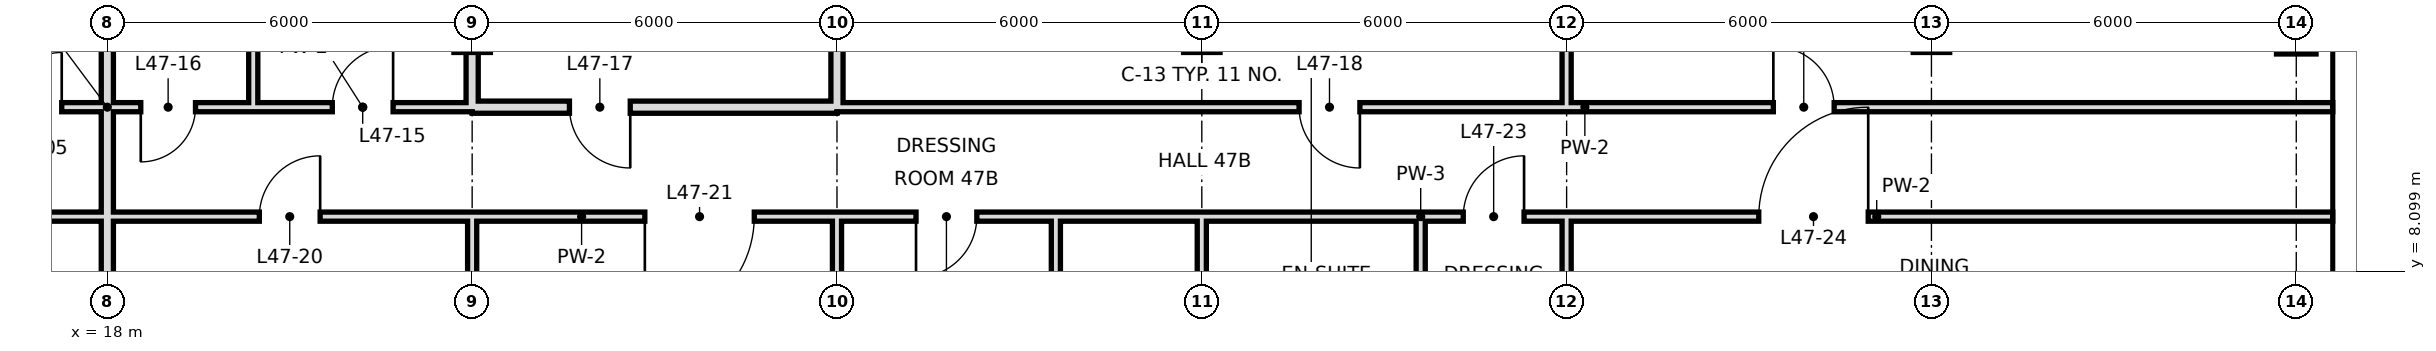
"""IFC4 building model, lengths in metres.
Left out: names, types, materials, properties, quantities, classifications, styles, units other than length and angle.
Written with IfcOpenShell. Run it as: python <this file> out.ifc"""

import sys

from ifc_helpers import new_model, si_unit, direction, frame, frame_2d, origin, origin_2d, place, context, subcontext, project, spatial, rectangle, hollow_rectangle, extrude, element, fill, save


model = new_model("IFC4")
c1 = context("Model", 3, precision=1e-05, world=origin(), true_north=direction((0.0, 1.0)))
c2 = subcontext(c1, "Body", "Model", "MODEL_VIEW")
j1 = project(units=[si_unit("LENGTHUNIT", "METRE"), si_unit("PLANEANGLEUNIT", "RADIAN")], contexts=[c1])
p1 = place(None, origin())
s1 = spatial("IfcSite", under=j1, at=p1, CompositionType="ELEMENT")
p2 = place(p1, origin())
s2 = spatial("IfcBuilding", under=s1, at=p2, CompositionType="ELEMENT")
p3 = place(p2, frame((0.0, 0.0, 202.8)))
s3 = spatial("IfcBuildingStorey", under=s2, at=p3, CompositionType="ELEMENT", Elevation=202.8)
p4 = place(p3, frame((54.0, 12.0, 0.0), z_axis=(0.0, 0.0, 1.0), x_axis=(1.0, 0.0, 0.0)))
e1 = element("IfcColumn", 1, at=p4, inside=s3, PredefinedType="COLUMN", context=c2, shape_type="SweptSolid", body=[
    extrude(hollow_rectangle(XDim=0.65, YDim=0.65, WallThickness=0.032, at=origin_2d()), origin(), (0.0, 0.0, 1.0), 3.6),
])
p5 = place(p3, frame((18.0, -0.6, 0.0), z_axis=(0.0, 0.0, 1.0), x_axis=(0.0, 1.0, 0.0)))
e2 = element("IfcWall", 2, at=p5, inside=s3, PredefinedType="SOLIDWALL", context=c2, shape_type="SweptSolid", body=[
    extrude(rectangle(XDim=15.9, YDim=0.2, at=frame_2d((7.95, 0.0))), origin(), (0.0, 0.0, 1.0), 2.72),
])
p6 = place(p3, frame((20.4, 10.8, 0.0), z_axis=(0.0, 0.0, 1.0), x_axis=(0.0, 1.0, 0.0)))
e3 = element("IfcWall", 3, at=p6, inside=s3, PredefinedType="PARTITIONING", context=c2, shape_type="SweptSolid", body=[
    extrude(rectangle(XDim=4.5, YDim=0.15, at=frame_2d((2.25, 0.0))), origin(), (0.0, 0.0, 1.0), 3.42),
])
p7 = place(p3, frame((24.0, 10.8, 0.0), z_axis=(0.0, 0.0, 1.0), x_axis=(0.0, 1.0, 0.0)))
e4 = element("IfcWall", 4, at=p7, inside=s3, PredefinedType="SOLIDWALL", context=c2, shape_type="SweptSolid", body=[
    extrude(rectangle(XDim=4.5, YDim=0.2, at=frame_2d((2.25, 0.0))), origin(), (0.0, 0.0, 1.0), 2.72),
])
p8 = place(p3, frame((24.0, 0.0, 0.0), z_axis=(0.0, 0.0, 1.0), x_axis=(0.0, 1.0, 0.0)))
e5 = element("IfcWall", 5, at=p8, inside=s3, PredefinedType="PARTITIONING", context=c2, shape_type="SweptSolid", body=[
    extrude(rectangle(XDim=9.0, YDim=0.15, at=frame_2d((4.5, 0.0))), origin(), (0.0, 0.0, 1.0), 2.72),
])
p9 = place(p3, frame((30.0, 10.8, 0.0), z_axis=(0.0, 0.0, 1.0), x_axis=(0.0, 1.0, 0.0)))
e6 = element("IfcWall", 6, at=p9, inside=s3, PredefinedType="SOLIDWALL", context=c2, shape_type="SweptSolid", body=[
    extrude(rectangle(XDim=4.5, YDim=0.2, at=frame_2d((2.25, 0.0))), origin(), (0.0, 0.0, 1.0), 2.72),
])
p10 = place(p3, frame((30.0, -0.6, 0.0), z_axis=(0.0, 0.0, 1.0), x_axis=(0.0, 1.0, 0.0)))
e7 = element("IfcWall", 7, at=p10, inside=s3, PredefinedType="PARTITIONING", context=c2, shape_type="SweptSolid", body=[
    extrude(rectangle(XDim=9.6, YDim=0.15, at=frame_2d((4.8, 0.0))), origin(), (0.0, 0.0, 1.0), 2.72),
])
p11 = place(p3, frame((33.6, 6.0, 0.0), z_axis=(0.0, 0.0, 1.0), x_axis=(0.0, 1.0, 0.0)))
e8 = element("IfcWall", 8, at=p11, inside=s3, PredefinedType="PARTITIONING", context=c2, shape_type="SweptSolid", body=[
    extrude(rectangle(XDim=3.0, YDim=0.15, at=frame_2d((1.5, 0.0))), origin(), (0.0, 0.0, 1.0), 3.42),
])
p12 = place(p3, frame((36.0, 6.0, 0.0), z_axis=(0.0, 0.0, 1.0), x_axis=(0.0, 1.0, 0.0)))
e9 = element("IfcWall", 9, at=p12, inside=s3, PredefinedType="PARTITIONING", context=c2, shape_type="SweptSolid", body=[
    extrude(rectangle(XDim=3.0, YDim=0.15, at=frame_2d((1.5, 0.0))), origin(), (0.0, 0.0, 1.0), 2.72),
])
p13 = place(p3, frame((39.6, 6.0, 0.0), z_axis=(0.0, 0.0, 1.0), x_axis=(0.0, 1.0, 0.0)))
e10 = element("IfcWall", 10, at=p13, inside=s3, PredefinedType="PARTITIONING", context=c2, shape_type="SweptSolid", body=[
    extrude(rectangle(XDim=3.0, YDim=0.15, at=frame_2d((1.5, 0.0))), origin(), (0.0, 0.0, 1.0), 3.42),
])
p14 = place(p3, frame((42.0, -0.6, 0.0), z_axis=(0.0, 0.0, 1.0), x_axis=(0.0, 1.0, 0.0)))
e11 = element("IfcWall", 11, at=p14, inside=s3, PredefinedType="PARTITIONING", context=c2, shape_type="SweptSolid", body=[
    extrude(rectangle(XDim=9.6, YDim=0.15, at=frame_2d((4.8, 0.0))), origin(), (0.0, 0.0, 1.0), 2.72),
])
p15 = place(p3, frame((42.0, 10.8, 0.0), z_axis=(0.0, 0.0, 1.0), x_axis=(0.0, 1.0, 0.0)))
e12 = element("IfcWall", 12, at=p15, inside=s3, PredefinedType="PARTITIONING", context=c2, shape_type="SweptSolid", body=[
    extrude(rectangle(XDim=4.5, YDim=0.15, at=frame_2d((2.25, 0.0))), origin(), (0.0, 0.0, 1.0), 2.72),
])
p16 = place(p3, frame((24.0, 10.8, 0.0), z_axis=(0.0, 0.0, 1.0), x_axis=(1.0, 0.0, 0.0)))
e13 = element("IfcWall", 13, at=p16, inside=s3, PredefinedType="SOLIDWALL", context=c2, shape_type="SweptSolid", body=[
    extrude(rectangle(XDim=6.0, YDim=0.2, at=frame_2d((3.0, 0.0))), origin(), (0.0, 0.0, 1.0), 2.72),
])
p17 = place(p16, frame((1.6, 0.0, 0.0)))
e14 = element("IfcOpeningElement", 14, at=p17, cuts=e13, PredefinedType="OPENING", context=c2, shape_type="SweptSolid", body=[
    extrude(rectangle(XDim=1.0, YDim=2.4, at=frame_2d((0.5, 1.2))), frame((0.0, 0.11, 0.0), z_axis=(0.0, -1.0, 0.0), x_axis=(1.0, 0.0, 0.0)), (0.0, 0.0, 1.0), 0.22),
])
p18 = place(p3, frame((20.4, 10.8, 0.0), z_axis=(0.0, 0.0, 1.0), x_axis=(1.0, 0.0, 0.0)))
e15 = element("IfcWall", 15, at=p18, inside=s3, PredefinedType="PARTITIONING", context=c2, shape_type="SweptSolid", body=[
    extrude(rectangle(XDim=3.6, YDim=0.15, at=frame_2d((1.8, 0.0))), origin(), (0.0, 0.0, 1.0), 3.42),
])
p19 = place(p18, frame((1.3, 0.0, 0.0)))
e16 = element("IfcOpeningElement", 16, at=p19, cuts=e15, PredefinedType="OPENING", context=c2, shape_type="SweptSolid", body=[
    extrude(rectangle(XDim=1.0, YDim=2.4, at=frame_2d((0.5, 1.2))), frame((0.0, 0.085, 0.0), z_axis=(0.0, -1.0, 0.0), x_axis=(1.0, 0.0, 0.0)), (0.0, 0.0, 1.0), 0.17),
])
p20 = place(p3, frame((30.0, 10.8, 0.0), z_axis=(0.0, 0.0, 1.0), x_axis=(1.0, 0.0, 0.0)))
e17 = element("IfcWall", 17, at=p20, inside=s3, PredefinedType="PARTITIONING", context=c2, shape_type="SweptSolid", body=[
    extrude(rectangle(XDim=24.6, YDim=0.15, at=frame_2d((12.3, 0.0))), origin(), (0.0, 0.0, 1.0), 3.42),
])
p21 = place(p20, frame((7.6, 0.0, 0.0)))
e18 = element("IfcOpeningElement", 18, at=p21, cuts=e17, PredefinedType="OPENING", context=c2, shape_type="SweptSolid", body=[
    extrude(rectangle(XDim=1.0, YDim=2.4, at=frame_2d((0.5, 1.2))), frame((0.0, 0.085, 0.0), z_axis=(0.0, -1.0, 0.0), x_axis=(1.0, 0.0, 0.0)), (0.0, 0.0, 1.0), 0.17),
])
p22 = place(p20, frame((15.4, 0.0, 0.0)))
e19 = element("IfcOpeningElement", 19, at=p22, cuts=e17, PredefinedType="OPENING", context=c2, shape_type="SweptSolid", body=[
    extrude(rectangle(XDim=1.0, YDim=2.4, at=frame_2d((0.5, 1.2))), frame((0.0, 0.085, 0.0), z_axis=(0.0, -1.0, 0.0), x_axis=(1.0, 0.0, 0.0)), (0.0, 0.0, 1.0), 0.17),
])
p23 = place(p3, frame((15.6, 10.8, 0.0), z_axis=(0.0, 0.0, 1.0), x_axis=(1.0, 0.0, 0.0)))
e20 = element("IfcWall", 20, at=p23, inside=s3, PredefinedType="PARTITIONING", context=c2, shape_type="SweptSolid", body=[
    extrude(rectangle(XDim=4.8, YDim=0.15, at=frame_2d((2.4, 0.0))), origin(), (0.0, 0.0, 1.0), 3.42),
])
p24 = place(p23, frame((0.75, 0.0, 0.0)))
e21 = element("IfcOpeningElement", 21, at=p24, cuts=e20, PredefinedType="OPENING", context=c2, shape_type="SweptSolid", body=[
    extrude(rectangle(XDim=0.9, YDim=2.4, at=frame_2d((0.45, 1.2))), frame((0.0, 0.085, 0.0), z_axis=(0.0, -1.0, 0.0), x_axis=(1.0, 0.0, 0.0)), (0.0, 0.0, 1.0), 0.17),
])
p25 = place(p23, frame((2.95, 0.0, 0.0)))
e22 = element("IfcOpeningElement", 22, at=p25, cuts=e20, PredefinedType="OPENING", context=c2, shape_type="SweptSolid", body=[
    extrude(rectangle(XDim=0.9, YDim=2.4, at=frame_2d((0.45, 1.2))), frame((0.0, 0.085, 0.0), z_axis=(0.0, -1.0, 0.0), x_axis=(1.0, 0.0, 0.0)), (0.0, 0.0, 1.0), 0.17),
])
p26 = place(p3, frame((18.0, 9.0, 0.0), z_axis=(0.0, 0.0, 1.0), x_axis=(1.0, 0.0, 0.0)))
e23 = element("IfcWall", 23, at=p26, inside=s3, PredefinedType="PARTITIONING", context=c2, shape_type="SweptSolid", body=[
    extrude(rectangle(XDim=15.6, YDim=0.15, at=frame_2d((7.8, 0.0))), origin(), (0.0, 0.0, 1.0), 3.42),
])
p27 = place(p26, frame((2.5, 0.0, 0.0)))
e24 = element("IfcOpeningElement", 24, at=p27, cuts=e23, PredefinedType="OPENING", context=c2, shape_type="SweptSolid", body=[
    extrude(rectangle(XDim=1.0, YDim=2.4, at=frame_2d((0.5, 1.2))), frame((0.0, 0.085, 0.0), z_axis=(0.0, -1.0, 0.0), x_axis=(1.0, 0.0, 0.0)), (0.0, 0.0, 1.0), 0.17),
])
p28 = place(p26, frame((8.84, 0.0, 0.0)))
e25 = element("IfcOpeningElement", 25, at=p28, cuts=e23, PredefinedType="OPENING", context=c2, shape_type="SweptSolid", body=[
    extrude(rectangle(XDim=1.8, YDim=2.4, at=frame_2d((0.9, 1.2))), frame((0.0, 0.085, 0.0), z_axis=(0.0, -1.0, 0.0), x_axis=(1.0, 0.0, 0.0)), (0.0, 0.0, 1.0), 0.17),
])
p29 = place(p26, frame((13.3, 0.0, 0.0)))
e26 = element("IfcOpeningElement", 26, at=p29, cuts=e23, PredefinedType="OPENING", context=c2, shape_type="SweptSolid", body=[
    extrude(rectangle(XDim=1.0, YDim=2.4, at=frame_2d((0.5, 1.2))), frame((0.0, 0.085, 0.0), z_axis=(0.0, -1.0, 0.0), x_axis=(1.0, 0.0, 0.0)), (0.0, 0.0, 1.0), 0.17),
])
p30 = place(p3, frame((39.6, 9.0, 0.0), z_axis=(0.0, 0.0, 1.0), x_axis=(1.0, 0.0, 0.0)))
e27 = element("IfcWall", 27, at=p30, inside=s3, PredefinedType="PARTITIONING", context=c2, shape_type="SweptSolid", body=[
    extrude(rectangle(XDim=15.0, YDim=0.15, at=frame_2d((7.5, 0.0))), origin(), (0.0, 0.0, 1.0), 3.42),
])
p31 = place(p30, frame((0.7, 0.0, 0.0)))
e28 = element("IfcOpeningElement", 28, at=p31, cuts=e27, PredefinedType="OPENING", context=c2, shape_type="SweptSolid", body=[
    extrude(rectangle(XDim=1.0, YDim=2.4, at=frame_2d((0.5, 1.2))), frame((0.0, 0.085, 0.0), z_axis=(0.0, -1.0, 0.0), x_axis=(1.0, 0.0, 0.0)), (0.0, 0.0, 1.0), 0.17),
])
p32 = place(p30, frame((5.56, 0.0, 0.0)))
e29 = element("IfcOpeningElement", 29, at=p32, cuts=e27, PredefinedType="OPENING", context=c2, shape_type="SweptSolid", body=[
    extrude(rectangle(XDim=1.8, YDim=2.4, at=frame_2d((0.9, 1.2))), frame((0.0, 0.085, 0.0), z_axis=(0.0, -1.0, 0.0), x_axis=(1.0, 0.0, 0.0)), (0.0, 0.0, 1.0), 0.17),
])
p33 = place(p3, frame((14.4, 9.0, 0.0), z_axis=(0.0, 0.0, 1.0), x_axis=(1.0, 0.0, 0.0)))
e30 = element("IfcWall", 30, at=p33, inside=s3, PredefinedType="PARTITIONING", context=c2, shape_type="SweptSolid", body=[
    extrude(rectangle(XDim=3.6, YDim=0.15, at=frame_2d((1.8, 0.0))), origin(), (0.0, 0.0, 1.0), 3.42),
])
p34 = place(p3, frame((33.6, 9.0, 0.0), z_axis=(0.0, 0.0, 1.0), x_axis=(1.0, 0.0, 0.0)))
e31 = element("IfcWall", 31, at=p34, inside=s3, PredefinedType="PARTITIONING", context=c2, shape_type="SweptSolid", body=[
    extrude(rectangle(XDim=6.0, YDim=0.15, at=frame_2d((3.0, 0.0))), origin(), (0.0, 0.0, 1.0), 3.42),
])
p35 = place(p24, frame((0.9, 0.0, 0.0), z_axis=(0.0, 0.0, 1.0), x_axis=(-1.0, 0.0, 0.0)))
e32 = element("IfcDoor", 32, at=p35, inside=s3, OperationType="SINGLE_SWING_LEFT", PredefinedType="DOOR", context=c2, shape_type="SweptSolid", body=[
    extrude(rectangle(XDim=0.9, YDim=2.4, at=frame_2d((0.45, 1.2))), frame((0.0, 0.025, 0.0), z_axis=(0.0, -1.0, 0.0), x_axis=(1.0, 0.0, 0.0)), (0.0, 0.0, 1.0), 0.05),
])
fill(e21, e32)
p36 = place(p19, frame((1.0, 0.0, 0.0), z_axis=(0.0, 0.0, 1.0), x_axis=(-1.0, 0.0, 0.0)))
e33 = element("IfcDoor", 33, at=p36, inside=s3, OperationType="SINGLE_SWING_LEFT", PredefinedType="DOOR", context=c2, shape_type="SweptSolid", body=[
    extrude(rectangle(XDim=1.0, YDim=2.4, at=frame_2d((0.5, 1.2))), frame((0.0, 0.025, 0.0), z_axis=(0.0, -1.0, 0.0), x_axis=(1.0, 0.0, 0.0)), (0.0, 0.0, 1.0), 0.05),
])
fill(e16, e33)
p37 = place(p25, frame((0.9, 0.0, 0.0), z_axis=(0.0, 0.0, 1.0), x_axis=(-1.0, 0.0, 0.0)))
e34 = element("IfcDoor", 34, at=p37, inside=s3, OperationType="SINGLE_SWING_RIGHT", PredefinedType="DOOR", context=c2, shape_type="SweptSolid", body=[
    extrude(rectangle(XDim=0.9, YDim=2.4, at=frame_2d((0.45, 1.2))), frame((0.0, 0.025, 0.0), z_axis=(0.0, -1.0, 0.0), x_axis=(1.0, 0.0, 0.0)), (0.0, 0.0, 1.0), 0.05),
])
fill(e22, e34)
p38 = place(p17, origin())
e35 = element("IfcDoor", 35, at=p38, inside=s3, OperationType="SINGLE_SWING_RIGHT", PredefinedType="DOOR", context=c2, shape_type="SweptSolid", body=[
    extrude(rectangle(XDim=1.0, YDim=2.4, at=frame_2d((0.5, 1.2))), frame((0.0, 0.025, 0.0), z_axis=(0.0, -1.0, 0.0), x_axis=(1.0, 0.0, 0.0)), (0.0, 0.0, 1.0), 0.05),
])
fill(e14, e35)
p39 = place(p21, origin())
e36 = element("IfcDoor", 36, at=p39, inside=s3, OperationType="SINGLE_SWING_RIGHT", PredefinedType="DOOR", context=c2, shape_type="SweptSolid", body=[
    extrude(rectangle(XDim=1.0, YDim=2.4, at=frame_2d((0.5, 1.2))), frame((0.0, 0.025, 0.0), z_axis=(0.0, -1.0, 0.0), x_axis=(1.0, 0.0, 0.0)), (0.0, 0.0, 1.0), 0.05),
])
fill(e18, e36)
p40 = place(p22, origin())
e37 = element("IfcDoor", 37, at=p40, inside=s3, OperationType="SINGLE_SWING_LEFT", PredefinedType="DOOR", context=c2, shape_type="SweptSolid", body=[
    extrude(rectangle(XDim=1.0, YDim=2.4, at=frame_2d((0.5, 1.2))), frame((0.0, 0.025, 0.0), z_axis=(0.0, -1.0, 0.0), x_axis=(1.0, 0.0, 0.0)), (0.0, 0.0, 1.0), 0.05),
])
fill(e19, e37)
p41 = place(p27, frame((1.0, 0.0, 0.0), z_axis=(0.0, 0.0, 1.0), x_axis=(-1.0, 0.0, 0.0)))
e38 = element("IfcDoor", 38, at=p41, inside=s3, OperationType="SINGLE_SWING_LEFT", PredefinedType="DOOR", context=c2, shape_type="SweptSolid", body=[
    extrude(rectangle(XDim=1.0, YDim=2.4, at=frame_2d((0.5, 1.2))), frame((0.0, 0.025, 0.0), z_axis=(0.0, -1.0, 0.0), x_axis=(1.0, 0.0, 0.0)), (0.0, 0.0, 1.0), 0.05),
])
fill(e24, e38)
p42 = place(p28, frame((1.8, 0.0, 0.0), z_axis=(0.0, 0.0, 1.0), x_axis=(-1.0, 0.0, 0.0)))
e39 = element("IfcDoor", 39, at=p42, inside=s3, OperationType="SINGLE_SWING_RIGHT", PredefinedType="DOOR", context=c2, shape_type="SweptSolid", body=[
    extrude(rectangle(XDim=1.8, YDim=2.4, at=frame_2d((0.9, 1.2))), frame((0.0, 0.025, 0.0), z_axis=(0.0, -1.0, 0.0), x_axis=(1.0, 0.0, 0.0)), (0.0, 0.0, 1.0), 0.05),
])
fill(e25, e39)
p43 = place(p29, frame((1.0, 0.0, 0.0), z_axis=(0.0, 0.0, 1.0), x_axis=(-1.0, 0.0, 0.0)))
e40 = element("IfcDoor", 40, at=p43, inside=s3, OperationType="SINGLE_SWING_RIGHT", PredefinedType="DOOR", context=c2, shape_type="SweptSolid", body=[
    extrude(rectangle(XDim=1.0, YDim=2.4, at=frame_2d((0.5, 1.2))), frame((0.0, 0.025, 0.0), z_axis=(0.0, -1.0, 0.0), x_axis=(1.0, 0.0, 0.0)), (0.0, 0.0, 1.0), 0.05),
])
fill(e26, e40)
p44 = place(p31, frame((1.0, 0.0, 0.0), z_axis=(0.0, 0.0, 1.0), x_axis=(-1.0, 0.0, 0.0)))
e41 = element("IfcDoor", 41, at=p44, inside=s3, OperationType="SINGLE_SWING_LEFT", PredefinedType="DOOR", context=c2, shape_type="SweptSolid", body=[
    extrude(rectangle(XDim=1.0, YDim=2.4, at=frame_2d((0.5, 1.2))), frame((0.0, 0.025, 0.0), z_axis=(0.0, -1.0, 0.0), x_axis=(1.0, 0.0, 0.0)), (0.0, 0.0, 1.0), 0.05),
])
fill(e28, e41)
p45 = place(p32, frame((1.8, 0.0, 0.0), z_axis=(0.0, 0.0, 1.0), x_axis=(-1.0, 0.0, 0.0)))
e42 = element("IfcDoor", 42, at=p45, inside=s3, OperationType="SINGLE_SWING_LEFT", PredefinedType="DOOR", context=c2, shape_type="SweptSolid", body=[
    extrude(rectangle(XDim=1.8, YDim=2.4, at=frame_2d((0.9, 1.2))), frame((0.0, 0.025, 0.0), z_axis=(0.0, -1.0, 0.0), x_axis=(1.0, 0.0, 0.0)), (0.0, 0.0, 1.0), 0.05),
])
fill(e29, e42)
save(model, sys.argv[1])
